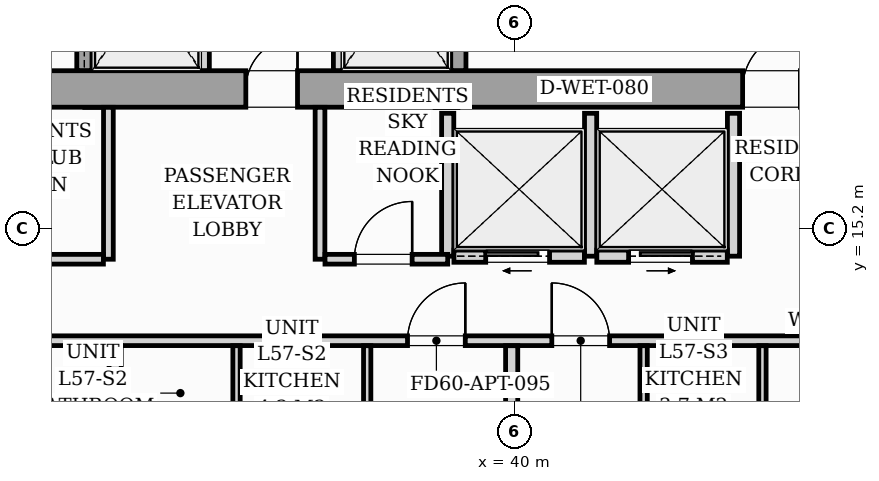
"""IFC4 building model, lengths in metres.
Left out: names, types, materials, properties, quantities, classifications, styles, units other than length and angle.
Written with IfcOpenShell. Run it as: python <this file> out.ifc"""

import sys

from ifc_helpers import new_model, si_unit, direction, frame, frame_2d, origin, origin_2d, place, context, subcontext, project, spatial, rectangle, i_section, extrude, source, transform, mapped, element, fill, save


model = new_model("IFC4")
c1 = context("Model", 3, precision=1e-05, world=origin(), true_north=direction((0.0, 1.0)))
c2 = subcontext(c1, "Body", "Model", "MODEL_VIEW")
j1 = project(units=[si_unit("LENGTHUNIT", "METRE"), si_unit("PLANEANGLEUNIT", "RADIAN")], contexts=[c1])
p1 = place(None, origin())
s1 = spatial("IfcSite", under=j1, at=p1, CompositionType="ELEMENT")
p2 = place(p1, origin())
s2 = spatial("IfcBuilding", under=s1, at=p2, CompositionType="ELEMENT")
p3 = place(p2, frame((0.0, 0.0, 198.6)))
s3 = spatial("IfcBuildingStorey", under=s2, at=p3, CompositionType="ELEMENT", Elevation=198.6)
m1 = source(origin(), c2, "Body", "SweptSolid", [
    extrude(i_section(OverallWidth=0.416, OverallDepth=0.446, WebThickness=0.039, FlangeThickness=0.063, FilletRadius=0.018, at=origin_2d()), origin(), (0.0, 0.0, 1.0), 3.196),
])
for number, where, z_axis, x_axis in (
    (1, (33.12, 17.4, 0.002), (0.0, 0.0, 1.0), (1.0, 0.0, 0.0)),
    (2, (38.88, 17.4, 0.002), (0.0, 0.0, 1.0), (1.0, 0.0, 0.0)),
):
    element("IfcColumn", number, at=place(p3, frame(where, z_axis=z_axis, x_axis=x_axis)), inside=s3, PredefinedType="PILASTER", context=c2, shape_type="MappedRepresentation", body=[
        mapped(m1, transform((0.0, 0.0, 0.0), scale=1.0)),
    ])
p4 = place(p3, frame((26.2, 17.5, 0.0), z_axis=(0.0, 0.0, 1.0), x_axis=(1.0, 0.0, 0.0)))
e3 = element("IfcWall", 3, at=p4, inside=s3, PredefinedType="SHEAR", context=c2, shape_type="SweptSolid", body=[
    extrude(rectangle(XDim=19.6, YDim=0.6, at=frame_2d((9.8, 0.0))), origin(), (0.0, 0.0, 1.0), 3.2),
])
p5 = place(p4, frame((0.95, 0.0, 0.0)))
e4 = element("IfcOpeningElement", 4, at=p5, cuts=e3, PredefinedType="OPENING", context=c2, shape_type="SweptSolid", body=[
    extrude(rectangle(XDim=0.95, YDim=2.06, at=frame_2d((0.475, 1.03))), frame((0.0, 0.31, 0.0), z_axis=(0.0, -1.0, 0.0), x_axis=(1.0, 0.0, 0.0)), (0.0, 0.0, 1.0), 0.62),
])
p6 = place(p4, frame((9.38, 0.0, 0.0)))
e5 = element("IfcOpeningElement", 5, at=p6, cuts=e3, PredefinedType="OPENING", context=c2, shape_type="SweptSolid", body=[
    extrude(rectangle(XDim=0.85, YDim=2.0, at=frame_2d((0.425, 1.0))), frame((0.0, 0.31, 0.0), z_axis=(0.0, -1.0, 0.0), x_axis=(1.0, 0.0, 0.0)), (0.0, 0.0, 1.0), 0.62),
])
p7 = place(p4, frame((17.55, 0.0, 0.0)))
e6 = element("IfcOpeningElement", 6, at=p7, cuts=e3, PredefinedType="OPENING", context=c2, shape_type="SweptSolid", body=[
    extrude(rectangle(XDim=0.95, YDim=2.06, at=frame_2d((0.475, 1.03))), frame((0.0, 0.31, 0.0), z_axis=(0.0, -1.0, 0.0), x_axis=(1.0, 0.0, 0.0)), (0.0, 0.0, 1.0), 0.62),
])
p8 = place(p3, frame((32.925, 17.802, 0.0), z_axis=(0.0, 0.0, 1.0), x_axis=(0.0, 1.0, 0.0)))
e7 = element("IfcWall", 7, at=p8, inside=s3, PredefinedType="SOLIDWALL", context=c2, shape_type="SweptSolid", body=[
    extrude(rectangle(XDim=2.646, YDim=0.25, at=frame_2d((1.323, 0.0))), origin(), (0.0, 0.0, 1.0), 3.2),
])
p9 = place(p8, frame((0.548, 0.0, 0.0)))
e8 = element("IfcOpeningElement", 8, at=p9, cuts=e7, PredefinedType="OPENING", context=c2, shape_type="SweptSolid", body=[
    extrude(rectangle(XDim=1.1, YDim=2.08, at=frame_2d((0.55, 1.04))), frame((0.0, 0.135, 0.0), z_axis=(0.0, -1.0, 0.0), x_axis=(1.0, 0.0, 0.0)), (0.0, 0.0, 1.0), 0.27),
])
for number, where, z_axis, x_axis in (
    (9, (34.9, 17.802, 0.0), (0.0, 0.0, 1.0), (0.0, 1.0, 0.0)),
    (10, (37.1, 17.802, 0.0), (0.0, 0.0, 1.0), (0.0, 1.0, 0.0)),
):
    element("IfcWall", number, at=place(p3, frame(where, z_axis=z_axis, x_axis=x_axis)), inside=s3, PredefinedType="PARTITIONING", context=c2, shape_type="SweptSolid", body=[
        extrude(rectangle(XDim=2.646, YDim=0.16, at=frame_2d((1.323, 0.0))), origin(), (0.0, 0.0, 1.0), 2.94),
    ])
p10 = place(p3, frame((39.075, 17.802, 0.0), z_axis=(0.0, 0.0, 1.0), x_axis=(0.0, 1.0, 0.0)))
e11 = element("IfcWall", 11, at=p10, inside=s3, PredefinedType="SOLIDWALL", context=c2, shape_type="SweptSolid", body=[
    extrude(rectangle(XDim=2.646, YDim=0.25, at=frame_2d((1.323, 0.0))), origin(), (0.0, 0.0, 1.0), 3.2),
])
p11 = place(p10, frame((0.548, 0.0, 0.0)))
e12 = element("IfcOpeningElement", 12, at=p11, cuts=e11, PredefinedType="OPENING", context=c2, shape_type="SweptSolid", body=[
    extrude(rectangle(XDim=1.1, YDim=2.08, at=frame_2d((0.55, 1.04))), frame((0.0, 0.135, 0.0), z_axis=(0.0, -1.0, 0.0), x_axis=(1.0, 0.0, 0.0)), (0.0, 0.0, 1.0), 0.27),
])
for number, where, z_axis, x_axis in (
    (13, (38.9, 14.75, 0.0), (0.0, 0.0, 1.0), (0.0, 1.0, 0.0)),
    (14, (41.25, 14.75, 0.0), (0.0, 0.0, 1.0), (0.0, 1.0, 0.0)),
    (15, (43.6, 14.75, 0.0), (0.0, 0.0, 1.0), (0.0, 1.0, 0.0)),
):
    element("IfcWall", number, at=place(p3, frame(where, z_axis=z_axis, x_axis=x_axis)), inside=s3, PredefinedType="PARTITIONING", context=c2, shape_type="SweptSolid", body=[
        extrude(rectangle(XDim=2.35, YDim=0.2, at=frame_2d((1.175, 0.0))), origin(), (0.0, 0.0, 1.0), 2.94),
    ])
p12 = place(p3, frame((39.002, 14.75, 0.0), z_axis=(0.0, 0.0, 1.0), x_axis=(1.0, 0.0, 0.0)))
e16 = element("IfcWall", 16, at=p12, inside=s3, PredefinedType="PARTITIONING", context=c2, shape_type="SweptSolid", body=[
    extrude(rectangle(XDim=2.146, YDim=0.2, at=frame_2d((1.073, 0.0))), origin(), (0.0, 0.0, 1.0), 2.94),
])
p13 = place(p12, frame((0.523, 0.0, 0.0)))
e17 = element("IfcOpeningElement", 17, at=p13, cuts=e16, PredefinedType="OPENING", context=c2, shape_type="SweptSolid", body=[
    extrude(rectangle(XDim=1.05, YDim=2.08, at=frame_2d((0.525, 1.04))), frame((0.0, 0.11, 0.0), z_axis=(0.0, -1.0, 0.0), x_axis=(1.0, 0.0, 0.0)), (0.0, 0.0, 1.0), 0.22),
])
p14 = place(p3, frame((41.352, 14.75, 0.0), z_axis=(0.0, 0.0, 1.0), x_axis=(1.0, 0.0, 0.0)))
e18 = element("IfcWall", 18, at=p14, inside=s3, PredefinedType="PARTITIONING", context=c2, shape_type="SweptSolid", body=[
    extrude(rectangle(XDim=2.146, YDim=0.2, at=frame_2d((1.073, 0.0))), origin(), (0.0, 0.0, 1.0), 2.94),
])
p15 = place(p14, frame((0.523, 0.0, 0.0)))
e19 = element("IfcOpeningElement", 19, at=p15, cuts=e18, PredefinedType="OPENING", context=c2, shape_type="SweptSolid", body=[
    extrude(rectangle(XDim=1.05, YDim=2.08, at=frame_2d((0.525, 1.04))), frame((0.0, 0.11, 0.0), z_axis=(0.0, -1.0, 0.0), x_axis=(1.0, 0.0, 0.0)), (0.0, 0.0, 1.0), 0.22),
])
p16 = place(p3, frame((26.12, 13.36, 0.0), z_axis=(0.0, 0.0, 1.0), x_axis=(1.0, 0.0, 0.0)))
e20 = element("IfcWall", 20, at=p16, inside=s3, PredefinedType="PARTITIONING", context=c2, shape_type="SweptSolid", body=[
    extrude(rectangle(XDim=19.76, YDim=0.16, at=frame_2d((9.88, 0.0))), origin(), (0.0, 0.0, 1.0), 2.94),
])
p17 = place(p16, frame((5.221, 0.0, 0.0)))
e21 = element("IfcOpeningElement", 21, at=p17, cuts=e20, PredefinedType="OPENING", context=c2, shape_type="SweptSolid", body=[
    extrude(rectangle(XDim=0.95, YDim=2.06, at=frame_2d((0.475, 1.03))), frame((0.0, 0.09, 0.0), z_axis=(0.0, -1.0, 0.0), x_axis=(1.0, 0.0, 0.0)), (0.0, 0.0, 1.0), 0.18),
])
p18 = place(p16, frame((12.119, 0.0, 0.0)))
e22 = element("IfcOpeningElement", 22, at=p18, cuts=e20, PredefinedType="OPENING", context=c2, shape_type="SweptSolid", body=[
    extrude(rectangle(XDim=0.95, YDim=2.06, at=frame_2d((0.475, 1.03))), frame((0.0, 0.09, 0.0), z_axis=(0.0, -1.0, 0.0), x_axis=(1.0, 0.0, 0.0)), (0.0, 0.0, 1.0), 0.18),
])
p19 = place(p16, frame((14.492, 0.0, 0.0)))
e23 = element("IfcOpeningElement", 23, at=p19, cuts=e20, PredefinedType="OPENING", context=c2, shape_type="SweptSolid", body=[
    extrude(rectangle(XDim=0.95, YDim=2.06, at=frame_2d((0.475, 1.03))), frame((0.0, 0.09, 0.0), z_axis=(0.0, -1.0, 0.0), x_axis=(1.0, 0.0, 0.0)), (0.0, 0.0, 1.0), 0.18),
])
p20 = place(p3, frame((33.431, 7.782, 0.0), z_axis=(0.0, 0.0, 1.0), x_axis=(0.0, 1.0, 0.0)))
e24 = element("IfcWall", 24, at=p20, inside=s3, PredefinedType="PARTITIONING", context=c2, shape_type="SweptSolid", body=[
    extrude(rectangle(XDim=5.496, YDim=0.2, at=frame_2d((2.748, 0.0))), origin(), (0.0, 0.0, 1.0), 2.94),
])
for number, where, z_axis, x_axis in (
    (25, (37.576, 11.172, 0.0), (0.0, 0.0, 1.0), (0.0, 1.0, 0.0)),
    (26, (35.427, 11.172, 0.0), (0.0, 0.0, 1.0), (0.0, 1.0, 0.0)),
):
    element("IfcWall", number, at=place(p3, frame(where, z_axis=z_axis, x_axis=x_axis)), inside=s3, PredefinedType="PARTITIONING", context=c2, shape_type="SweptSolid", body=[
        extrude(rectangle(XDim=2.106, YDim=0.12, at=frame_2d((1.053, 0.0))), origin(), (0.0, 0.0, 1.0), 2.94),
    ])
p21 = place(p3, frame((39.952, 8.41, 0.0), z_axis=(0.0, 0.0, 1.0), x_axis=(0.0, 1.0, 0.0)))
e27 = element("IfcWall", 27, at=p21, inside=s3, PredefinedType="PARTITIONING", context=c2, shape_type="SweptSolid", body=[
    extrude(rectangle(XDim=4.868, YDim=0.2, at=frame_2d((2.434, 0.0))), origin(), (0.0, 0.0, 1.0), 2.94),
])
for number, where, z_axis, x_axis in (
    (28, (42.122, 11.279, 0.0), (0.0, 0.0, 1.0), (0.0, 1.0, 0.0)),
    (29, (44.076, 11.279, 0.0), (0.0, 0.0, 1.0), (0.0, 1.0, 0.0)),
):
    element("IfcWall", number, at=place(p3, frame(where, z_axis=z_axis, x_axis=x_axis)), inside=s3, PredefinedType="PARTITIONING", context=c2, shape_type="SweptSolid", body=[
        extrude(rectangle(XDim=1.999, YDim=0.12, at=frame_2d((1.0, 0.0))), origin(), (0.0, 0.0, 1.0), 2.94),
    ])
p22 = place(p3, frame((33.32, 14.7, 0.0), z_axis=(0.0, 0.0, 1.0), x_axis=(0.0, 1.0, 0.0)))
e30 = element("IfcWall", 30, at=p22, inside=s3, PredefinedType="PARTITIONING", context=c2, shape_type="SweptSolid", body=[
    extrude(rectangle(XDim=2.498, YDim=0.16, at=frame_2d((1.249, 0.0))), origin(), (0.0, 0.0, 1.0), 2.94),
])
p23 = place(p3, frame((28.442, 14.7, 0.0), z_axis=(0.0, 0.0, 1.0), x_axis=(1.0, 0.0, 0.0)))
e31 = element("IfcWall", 31, at=p23, inside=s3, PredefinedType="PARTITIONING", context=c2, shape_type="SweptSolid", body=[
    extrude(rectangle(XDim=4.796, YDim=0.16, at=frame_2d((2.398, 0.0))), origin(), (0.0, 0.0, 1.0), 2.94),
])
p24 = place(p23, frame((1.923, 0.0, 0.0)))
e32 = element("IfcOpeningElement", 32, at=p24, cuts=e31, PredefinedType="OPENING", context=c2, shape_type="SweptSolid", body=[
    extrude(rectangle(XDim=0.95, YDim=2.06, at=frame_2d((0.475, 1.03))), frame((0.0, 0.09, 0.0), z_axis=(0.0, -1.0, 0.0), x_axis=(1.0, 0.0, 0.0)), (0.0, 0.0, 1.0), 0.18),
])
p25 = place(p3, frame((36.8, 14.7, 0.0), z_axis=(0.0, 0.0, 1.0), x_axis=(0.0, 1.0, 0.0)))
e33 = element("IfcWall", 33, at=p25, inside=s3, PredefinedType="PARTITIONING", context=c2, shape_type="SweptSolid", body=[
    extrude(rectangle(XDim=2.498, YDim=0.16, at=frame_2d((1.249, 0.0))), origin(), (0.0, 0.0, 1.0), 2.94),
])
p26 = place(p3, frame((36.882, 14.7, 0.0), z_axis=(0.0, 0.0, 1.0), x_axis=(1.0, 0.0, 0.0)))
e34 = element("IfcWall", 34, at=p26, inside=s3, PredefinedType="PARTITIONING", context=c2, shape_type="SweptSolid", body=[
    extrude(rectangle(XDim=2.018, YDim=0.16, at=frame_2d((1.009, 0.0))), origin(), (0.0, 0.0, 1.0), 2.94),
])
p27 = place(p26, frame((0.483, 0.0, 0.0)))
e35 = element("IfcOpeningElement", 35, at=p27, cuts=e34, PredefinedType="OPENING", context=c2, shape_type="SweptSolid", body=[
    extrude(rectangle(XDim=0.95, YDim=2.06, at=frame_2d((0.475, 1.03))), frame((0.0, 0.09, 0.0), z_axis=(0.0, -1.0, 0.0), x_axis=(1.0, 0.0, 0.0)), (0.0, 0.0, 1.0), 0.18),
])
m2 = source(origin(), c2, "Body", "SweptSolid", [
    extrude(rectangle(XDim=0.85, YDim=2.0, at=frame_2d((0.425, 1.0))), frame((0.0, 0.025, 0.0), z_axis=(0.0, -1.0, 0.0), x_axis=(1.0, 0.0, 0.0)), (0.0, 0.0, 1.0), 0.05),
])
p28 = place(p6, origin())
e36 = element("IfcDoor", 36, at=p28, inside=s3, OperationType="SINGLE_SWING_RIGHT", PredefinedType="DOOR", context=c2, shape_type="MappedRepresentation", body=[
    mapped(m2, transform((0.0, 0.0, 0.0), scale=1.0)),
])
fill(e5, e36)
m3 = source(origin(), c2, "Body", "SweptSolid", [
    extrude(rectangle(XDim=0.95, YDim=2.06, at=frame_2d((0.475, 1.03))), frame((0.0, 0.025, 0.0), z_axis=(0.0, -1.0, 0.0), x_axis=(1.0, 0.0, 0.0)), (0.0, 0.0, 1.0), 0.05),
])
p29 = place(p7, origin())
e37 = element("IfcDoor", 37, at=p29, inside=s3, OperationType="SINGLE_SWING_RIGHT", PredefinedType="DOOR", context=c2, shape_type="MappedRepresentation", body=[
    mapped(m3, transform((0.0, 0.0, 0.0), scale=1.0)),
])
fill(e6, e37)
m4 = source(origin(), c2, "Body", "SweptSolid", [
    extrude(rectangle(XDim=1.05, YDim=2.08, at=frame_2d((0.525, 1.04))), frame((0.0, 0.025, 0.0), z_axis=(0.0, -1.0, 0.0), x_axis=(1.0, 0.0, 0.0)), (0.0, 0.0, 1.0), 0.05),
])
p30 = place(p13, origin())
e38 = element("IfcDoor", 38, at=p30, inside=s3, OperationType="SLIDING_TO_LEFT", PredefinedType="DOOR", context=c2, shape_type="MappedRepresentation", body=[
    mapped(m4, transform((0.0, 0.0, 0.0), scale=1.0)),
])
fill(e17, e38)
p31 = place(p15, origin())
e39 = element("IfcDoor", 39, at=p31, inside=s3, OperationType="SLIDING_TO_RIGHT", PredefinedType="DOOR", context=c2, shape_type="MappedRepresentation", body=[
    mapped(m4, transform((0.0, 0.0, 0.0), scale=1.0)),
])
fill(e19, e39)
m5 = source(origin(), c2, "Body", "SweptSolid", [
    extrude(rectangle(XDim=0.95, YDim=2.06, at=frame_2d((0.475, 1.03))), frame((0.0, 0.025, 0.0), z_axis=(0.0, -1.0, 0.0), x_axis=(1.0, 0.0, 0.0)), (0.0, 0.0, 1.0), 0.05),
])
p32 = place(p18, origin())
e40 = element("IfcDoor", 40, at=p32, inside=s3, OperationType="SINGLE_SWING_RIGHT", PredefinedType="DOOR", context=c2, shape_type="MappedRepresentation", body=[
    mapped(m5, transform((0.0, 0.0, 0.0), scale=1.0)),
])
fill(e22, e40)
p33 = place(p19, origin())
e41 = element("IfcDoor", 41, at=p33, inside=s3, OperationType="SINGLE_SWING_LEFT", PredefinedType="DOOR", context=c2, shape_type="MappedRepresentation", body=[
    mapped(m5, transform((0.0, 0.0, 0.0), scale=1.0)),
])
fill(e23, e41)
p34 = place(p27, origin())
e42 = element("IfcDoor", 42, at=p34, inside=s3, OperationType="SINGLE_SWING_RIGHT", PredefinedType="DOOR", context=c2, shape_type="MappedRepresentation", body=[
    mapped(m5, transform((0.0, 0.0, 0.0), scale=1.0)),
])
fill(e35, e42)
save(model, sys.argv[1])
